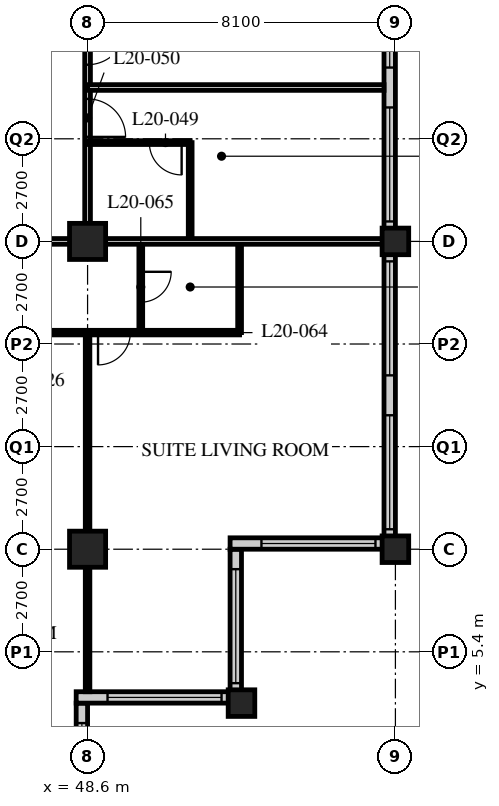
"""IFC4 building model, lengths in metres.
Left out: names, types, materials, properties, quantities, classifications, styles, units other than length and angle.
Written with IfcOpenShell. Run it as: python <this file> out.ifc"""

import sys

from ifc_helpers import new_model, si_unit, direction, frame, frame_2d, origin, origin_2d, place, context, subcontext, project, spatial, rectangle, hollow_rectangle, extrude, element, fill, save


model = new_model("IFC4")
c1 = context("Model", 3, precision=1e-05, world=origin(), true_north=direction((0.0, 1.0)))
c2 = subcontext(c1, "Body", "Model", "MODEL_VIEW")
j1 = project(units=[si_unit("LENGTHUNIT", "METRE"), si_unit("PLANEANGLEUNIT", "RADIAN")], contexts=[c1])
p1 = place(None, origin())
s1 = spatial("IfcSite", under=j1, at=p1, CompositionType="ELEMENT")
p2 = place(p1, origin())
s2 = spatial("IfcBuilding", under=s1, at=p2, CompositionType="ELEMENT")
p3 = place(p2, frame((0.0, 0.0, 80.6)))
s3 = spatial("IfcBuildingStorey", under=s2, at=p3, CompositionType="ELEMENT", Elevation=80.6)
for number, where, z_axis, x_axis in (
    (1, (48.6, 8.1, 0.0), (0.0, 0.0, 1.0), (1.0, 0.0, 0.0)),
    (2, (48.6, 16.2, 0.0), (0.0, 0.0, 1.0), (1.0, 0.0, 0.0)),
):
    element("IfcColumn", number, at=place(p3, frame(where, z_axis=z_axis, x_axis=x_axis)), inside=s3, PredefinedType="COLUMN", context=c2, shape_type="SweptSolid", body=[
        extrude(hollow_rectangle(XDim=0.95, YDim=0.95, WallThickness=0.095, at=origin_2d()), origin(), (0.0, 0.0, 1.0), 3.4),
    ])
p4 = place(p3, frame((52.65, 4.05, 0.0), z_axis=(0.0, 0.0, 1.0), x_axis=(1.0, 0.0, 0.0)))
e3 = element("IfcColumn", 3, at=p4, inside=s3, PredefinedType="COLUMN", context=c2, shape_type="SweptSolid", body=[
    extrude(hollow_rectangle(XDim=0.7, YDim=0.7, WallThickness=0.07, at=origin_2d()), origin(), (0.0, 0.0, 1.0), 3.4),
])
for number, where, z_axis, x_axis in (
    (4, (56.7, 8.1, 0.0), (0.0, 0.0, 1.0), (1.0, 0.0, 0.0)),
    (5, (56.7, 16.2, 0.0), (0.0, 0.0, 1.0), (1.0, 0.0, 0.0)),
):
    element("IfcColumn", number, at=place(p3, frame(where, z_axis=z_axis, x_axis=x_axis)), inside=s3, PredefinedType="COLUMN", context=c2, shape_type="SweptSolid", body=[
        extrude(hollow_rectangle(XDim=0.7, YDim=0.7, WallThickness=0.06, at=origin_2d()), origin(), (0.0, 0.0, 1.0), 3.4),
    ])
p5 = place(p3, frame((48.45, 0.3, 0.0), z_axis=(0.0, 0.0, 1.0), x_axis=(0.0, 1.0, 0.0)))
e6 = element("IfcWall", 6, at=p5, inside=s3, PredefinedType="SOLIDWALL", context=c2, shape_type="SweptSolid", body=[
    extrude(rectangle(XDim=3.75, YDim=0.3, at=frame_2d((1.875, 0.0))), origin(), (0.0, 0.0, 1.0), 3.19),
])
p6 = place(p5, frame((0.225, 0.0, 0.9)))
e7 = element("IfcOpeningElement", 7, at=p6, cuts=e6, PredefinedType="OPENING", context=c2, shape_type="SweptSolid", body=[
    extrude(rectangle(XDim=3.0, YDim=1.5, at=frame_2d((1.5, 0.75))), frame((0.0, 0.16, 0.0), z_axis=(0.0, -1.0, 0.0), x_axis=(1.0, 0.0, 0.0)), (0.0, 0.0, 1.0), 0.32),
])
p7 = place(p3, frame((48.3, 4.2, 0.0), z_axis=(0.0, 0.0, 1.0), x_axis=(1.0, 0.0, 0.0)))
e8 = element("IfcWall", 8, at=p7, inside=s3, PredefinedType="SOLIDWALL", context=c2, shape_type="SweptSolid", body=[
    extrude(rectangle(XDim=4.35, YDim=0.3, at=frame_2d((2.175, 0.0))), origin(), (0.0, 0.0, 1.0), 3.19),
])
p8 = place(p7, frame((0.825, 0.0, 0.9)))
e9 = element("IfcOpeningElement", 9, at=p8, cuts=e8, PredefinedType="OPENING", context=c2, shape_type="SweptSolid", body=[
    extrude(rectangle(XDim=3.0, YDim=1.5, at=frame_2d((1.5, 0.75))), frame((0.0, 0.16, 0.0), z_axis=(0.0, -1.0, 0.0), x_axis=(1.0, 0.0, 0.0)), (0.0, 0.0, 1.0), 0.32),
])
p9 = place(p3, frame((52.5, 4.35, 0.0), z_axis=(0.0, 0.0, 1.0), x_axis=(0.0, 1.0, 0.0)))
e10 = element("IfcWall", 10, at=p9, inside=s3, PredefinedType="SOLIDWALL", context=c2, shape_type="SweptSolid", body=[
    extrude(rectangle(XDim=3.75, YDim=0.3, at=frame_2d((1.875, 0.0))), origin(), (0.0, 0.0, 1.0), 3.19),
])
p10 = place(p9, frame((0.225, 0.0, 0.9)))
e11 = element("IfcOpeningElement", 11, at=p10, cuts=e10, PredefinedType="OPENING", context=c2, shape_type="SweptSolid", body=[
    extrude(rectangle(XDim=3.0, YDim=1.5, at=frame_2d((1.5, 0.75))), frame((0.0, 0.16, 0.0), z_axis=(0.0, -1.0, 0.0), x_axis=(1.0, 0.0, 0.0)), (0.0, 0.0, 1.0), 0.32),
])
p11 = place(p3, frame((52.35, 8.25, 0.0), z_axis=(0.0, 0.0, 1.0), x_axis=(1.0, 0.0, 0.0)))
e12 = element("IfcWall", 12, at=p11, inside=s3, PredefinedType="SOLIDWALL", context=c2, shape_type="SweptSolid", body=[
    extrude(rectangle(XDim=4.35, YDim=0.3, at=frame_2d((2.175, 0.0))), origin(), (0.0, 0.0, 1.0), 3.19),
])
p12 = place(p11, frame((0.825, 0.0, 0.9)))
e13 = element("IfcOpeningElement", 13, at=p12, cuts=e12, PredefinedType="OPENING", context=c2, shape_type="SweptSolid", body=[
    extrude(rectangle(XDim=3.0, YDim=1.5, at=frame_2d((1.5, 0.75))), frame((0.0, 0.16, 0.0), z_axis=(0.0, -1.0, 0.0), x_axis=(1.0, 0.0, 0.0)), (0.0, 0.0, 1.0), 0.32),
])
p13 = place(p3, frame((56.55, 8.4, 0.0), z_axis=(0.0, 0.0, 1.0), x_axis=(0.0, 1.0, 0.0)))
e14 = element("IfcWall", 14, at=p13, inside=s3, PredefinedType="SOLIDWALL", context=c2, shape_type="SweptSolid", body=[
    extrude(rectangle(XDim=32.1, YDim=0.3, at=frame_2d((16.05, 0.0))), origin(), (0.0, 0.0, 1.0), 3.19),
])
p14 = place(p13, frame((0.225, 0.0, 0.9)))
e15 = element("IfcOpeningElement", 15, at=p14, cuts=e14, PredefinedType="OPENING", context=c2, shape_type="SweptSolid", body=[
    extrude(rectangle(XDim=3.0, YDim=1.5, at=frame_2d((1.5, 0.75))), frame((0.0, 0.16, 0.0), z_axis=(0.0, -1.0, 0.0), x_axis=(1.0, 0.0, 0.0)), (0.0, 0.0, 1.0), 0.32),
])
p15 = place(p13, frame((4.275, 0.0, 0.9)))
e16 = element("IfcOpeningElement", 16, at=p15, cuts=e14, PredefinedType="OPENING", context=c2, shape_type="SweptSolid", body=[
    extrude(rectangle(XDim=3.0, YDim=1.5, at=frame_2d((1.5, 0.75))), frame((0.0, 0.16, 0.0), z_axis=(0.0, -1.0, 0.0), x_axis=(1.0, 0.0, 0.0)), (0.0, 0.0, 1.0), 0.32),
])
p16 = place(p13, frame((8.325, 0.0, 0.9)))
e17 = element("IfcOpeningElement", 17, at=p16, cuts=e14, PredefinedType="OPENING", context=c2, shape_type="SweptSolid", body=[
    extrude(rectangle(XDim=3.0, YDim=1.5, at=frame_2d((1.5, 0.75))), frame((0.0, 0.16, 0.0), z_axis=(0.0, -1.0, 0.0), x_axis=(1.0, 0.0, 0.0)), (0.0, 0.0, 1.0), 0.32),
])
p17 = place(p13, frame((12.375, 0.0, 0.9)))
e18 = element("IfcOpeningElement", 18, at=p17, cuts=e14, PredefinedType="OPENING", context=c2, shape_type="SweptSolid", body=[
    extrude(rectangle(XDim=3.0, YDim=1.5, at=frame_2d((1.5, 0.75))), frame((0.0, 0.16, 0.0), z_axis=(0.0, -1.0, 0.0), x_axis=(1.0, 0.0, 0.0)), (0.0, 0.0, 1.0), 0.32),
])
p18 = place(p13, frame((16.425, 0.0, 0.9)))
e19 = element("IfcOpeningElement", 19, at=p18, cuts=e14, PredefinedType="OPENING", context=c2, shape_type="SweptSolid", body=[
    extrude(rectangle(XDim=3.0, YDim=1.5, at=frame_2d((1.5, 0.75))), frame((0.0, 0.16, 0.0), z_axis=(0.0, -1.0, 0.0), x_axis=(1.0, 0.0, 0.0)), (0.0, 0.0, 1.0), 0.32),
])
p19 = place(p13, frame((20.475, 0.0, 0.9)))
e20 = element("IfcOpeningElement", 20, at=p19, cuts=e14, PredefinedType="OPENING", context=c2, shape_type="SweptSolid", body=[
    extrude(rectangle(XDim=3.0, YDim=1.5, at=frame_2d((1.5, 0.75))), frame((0.0, 0.16, 0.0), z_axis=(0.0, -1.0, 0.0), x_axis=(1.0, 0.0, 0.0)), (0.0, 0.0, 1.0), 0.32),
])
p20 = place(p13, frame((24.525, 0.0, 0.9)))
e21 = element("IfcOpeningElement", 21, at=p20, cuts=e14, PredefinedType="OPENING", context=c2, shape_type="SweptSolid", body=[
    extrude(rectangle(XDim=3.0, YDim=1.5, at=frame_2d((1.5, 0.75))), frame((0.0, 0.16, 0.0), z_axis=(0.0, -1.0, 0.0), x_axis=(1.0, 0.0, 0.0)), (0.0, 0.0, 1.0), 0.32),
])
p21 = place(p13, frame((28.575, 0.0, 0.9)))
e22 = element("IfcOpeningElement", 22, at=p21, cuts=e14, PredefinedType="OPENING", context=c2, shape_type="SweptSolid", body=[
    extrude(rectangle(XDim=3.0, YDim=1.5, at=frame_2d((1.5, 0.75))), frame((0.0, 0.16, 0.0), z_axis=(0.0, -1.0, 0.0), x_axis=(1.0, 0.0, 0.0)), (0.0, 0.0, 1.0), 0.32),
])
p22 = place(p3, frame((12.15, 16.2, 0.0), z_axis=(0.0, 0.0, 1.0), x_axis=(1.0, 0.0, 0.0)))
e23 = element("IfcWall", 23, at=p22, inside=s3, PredefinedType="PARTITIONING", context=c2, shape_type="SweptSolid", body=[
    extrude(rectangle(XDim=36.45, YDim=0.15, at=frame_2d((18.225, 0.0))), origin(), (0.0, 0.0, 1.0), 2.428),
])
p23 = place(p22, frame((6.5, 0.0, 0.0)))
e24 = element("IfcOpeningElement", 24, at=p23, cuts=e23, PredefinedType="OPENING", context=c2, shape_type="SweptSolid", body=[
    extrude(rectangle(XDim=1.0, YDim=2.1, at=frame_2d((0.5, 1.05))), frame((0.0, 0.085, 0.0), z_axis=(0.0, -1.0, 0.0), x_axis=(1.0, 0.0, 0.0)), (0.0, 0.0, 1.0), 0.17),
])
p24 = place(p22, frame((8.4, 0.0, 0.0)))
e25 = element("IfcOpeningElement", 25, at=p24, cuts=e23, PredefinedType="OPENING", context=c2, shape_type="SweptSolid", body=[
    extrude(rectangle(XDim=1.0, YDim=2.1, at=frame_2d((0.5, 1.05))), frame((0.0, 0.085, 0.0), z_axis=(0.0, -1.0, 0.0), x_axis=(1.0, 0.0, 0.0)), (0.0, 0.0, 1.0), 0.17),
])
p25 = place(p22, frame((14.9, 0.0, 0.0)))
e26 = element("IfcOpeningElement", 26, at=p25, cuts=e23, PredefinedType="OPENING", context=c2, shape_type="SweptSolid", body=[
    extrude(rectangle(XDim=1.0, YDim=2.1, at=frame_2d((0.5, 1.05))), frame((0.0, 0.085, 0.0), z_axis=(0.0, -1.0, 0.0), x_axis=(1.0, 0.0, 0.0)), (0.0, 0.0, 1.0), 0.17),
])
p26 = place(p22, frame((16.5, 0.0, 0.0)))
e27 = element("IfcOpeningElement", 27, at=p26, cuts=e23, PredefinedType="OPENING", context=c2, shape_type="SweptSolid", body=[
    extrude(rectangle(XDim=1.0, YDim=2.1, at=frame_2d((0.5, 1.05))), frame((0.0, 0.085, 0.0), z_axis=(0.0, -1.0, 0.0), x_axis=(1.0, 0.0, 0.0)), (0.0, 0.0, 1.0), 0.17),
])
p27 = place(p22, frame((22.7, 0.0, 0.0)))
e28 = element("IfcOpeningElement", 28, at=p27, cuts=e23, PredefinedType="OPENING", context=c2, shape_type="SweptSolid", body=[
    extrude(rectangle(XDim=1.0, YDim=2.1, at=frame_2d((0.5, 1.05))), frame((0.0, 0.085, 0.0), z_axis=(0.0, -1.0, 0.0), x_axis=(1.0, 0.0, 0.0)), (0.0, 0.0, 1.0), 0.17),
])
p28 = place(p22, frame((24.9, 0.0, 0.0)))
e29 = element("IfcOpeningElement", 29, at=p28, cuts=e23, PredefinedType="OPENING", context=c2, shape_type="SweptSolid", body=[
    extrude(rectangle(XDim=1.0, YDim=2.1, at=frame_2d((0.5, 1.05))), frame((0.0, 0.085, 0.0), z_axis=(0.0, -1.0, 0.0), x_axis=(1.0, 0.0, 0.0)), (0.0, 0.0, 1.0), 0.17),
])
p29 = place(p22, frame((30.8, 0.0, 0.0)))
e30 = element("IfcOpeningElement", 30, at=p29, cuts=e23, PredefinedType="OPENING", context=c2, shape_type="SweptSolid", body=[
    extrude(rectangle(XDim=1.0, YDim=2.1, at=frame_2d((0.5, 1.05))), frame((0.0, 0.085, 0.0), z_axis=(0.0, -1.0, 0.0), x_axis=(1.0, 0.0, 0.0)), (0.0, 0.0, 1.0), 0.17),
])
p30 = place(p22, frame((1.525, 0.0, 0.0)))
e31 = element("IfcOpeningElement", 31, at=p30, cuts=e23, PredefinedType="OPENING", context=c2, shape_type="SweptSolid", body=[
    extrude(rectangle(XDim=1.0, YDim=2.1, at=frame_2d((0.5, 1.05))), frame((0.0, 0.085, 0.0), z_axis=(0.0, -1.0, 0.0), x_axis=(1.0, 0.0, 0.0)), (0.0, 0.0, 1.0), 0.17),
])
p31 = place(p22, frame((33.925, 0.0, 0.0)))
e32 = element("IfcOpeningElement", 32, at=p31, cuts=e23, PredefinedType="OPENING", context=c2, shape_type="SweptSolid", body=[
    extrude(rectangle(XDim=1.0, YDim=2.1, at=frame_2d((0.5, 1.05))), frame((0.0, 0.085, 0.0), z_axis=(0.0, -1.0, 0.0), x_axis=(1.0, 0.0, 0.0)), (0.0, 0.0, 1.0), 0.17),
])
p32 = place(p3, frame((48.6, 16.2, 0.0), z_axis=(0.0, 0.0, 1.0), x_axis=(0.0, 1.0, 0.0)))
e33 = element("IfcWall", 33, at=p32, inside=s3, PredefinedType="PARTITIONING", context=c2, shape_type="SweptSolid", body=[
    extrude(rectangle(XDim=26.1, YDim=0.15, at=frame_2d((13.05, 0.0))), origin(), (0.0, 0.0, 1.0), 2.428),
])
p33 = place(p32, frame((2.75, 0.0, 0.0)))
e34 = element("IfcOpeningElement", 34, at=p33, cuts=e33, PredefinedType="OPENING", context=c2, shape_type="SweptSolid", body=[
    extrude(rectangle(XDim=1.0, YDim=2.1, at=frame_2d((0.5, 1.05))), frame((0.0, 0.085, 0.0), z_axis=(0.0, -1.0, 0.0), x_axis=(1.0, 0.0, 0.0)), (0.0, 0.0, 1.0), 0.17),
])
p34 = place(p32, frame((4.65, 0.0, 0.0)))
e35 = element("IfcOpeningElement", 35, at=p34, cuts=e33, PredefinedType="OPENING", context=c2, shape_type="SweptSolid", body=[
    extrude(rectangle(XDim=1.0, YDim=2.1, at=frame_2d((0.5, 1.05))), frame((0.0, 0.085, 0.0), z_axis=(0.0, -1.0, 0.0), x_axis=(1.0, 0.0, 0.0)), (0.0, 0.0, 1.0), 0.17),
])
p35 = place(p32, frame((13.55, 0.0, 0.0)))
e36 = element("IfcOpeningElement", 36, at=p35, cuts=e33, PredefinedType="OPENING", context=c2, shape_type="SweptSolid", body=[
    extrude(rectangle(XDim=1.0, YDim=2.1, at=frame_2d((0.5, 1.05))), frame((0.0, 0.085, 0.0), z_axis=(0.0, -1.0, 0.0), x_axis=(1.0, 0.0, 0.0)), (0.0, 0.0, 1.0), 0.17),
])
p36 = place(p32, frame((21.65, 0.0, 0.0)))
e37 = element("IfcOpeningElement", 37, at=p36, cuts=e33, PredefinedType="OPENING", context=c2, shape_type="SweptSolid", body=[
    extrude(rectangle(XDim=1.0, YDim=2.1, at=frame_2d((0.5, 1.05))), frame((0.0, 0.085, 0.0), z_axis=(0.0, -1.0, 0.0), x_axis=(1.0, 0.0, 0.0)), (0.0, 0.0, 1.0), 0.17),
])
p37 = place(p3, frame((51.3, 16.2, 0.0), z_axis=(0.0, 0.0, 1.0), x_axis=(0.0, 1.0, 0.0)))
e38 = element("IfcWall", 38, at=p37, inside=s3, PredefinedType="PARTITIONING", context=c2, shape_type="SweptSolid", body=[
    extrude(rectangle(XDim=2.6, YDim=0.1, at=frame_2d((1.3, 0.0))), origin(), (0.0, 0.0, 1.0), 3.19),
])
p38 = place(p3, frame((48.6, 18.8, 0.0), z_axis=(0.0, 0.0, 1.0), x_axis=(1.0, 0.0, 0.0)))
e39 = element("IfcWall", 39, at=p38, inside=s3, PredefinedType="PARTITIONING", context=c2, shape_type="SweptSolid", body=[
    extrude(rectangle(XDim=2.7, YDim=0.1, at=frame_2d((1.35, 0.0))), origin(), (0.0, 0.0, 1.0), 3.19),
])
p39 = place(p38, frame((1.625, 0.0, 0.0)))
e40 = element("IfcOpeningElement", 40, at=p39, cuts=e39, PredefinedType="OPENING", context=c2, shape_type="SweptSolid", body=[
    extrude(rectangle(XDim=0.85, YDim=2.1, at=frame_2d((0.425, 1.05))), frame((0.0, 0.06, 0.0), z_axis=(0.0, -1.0, 0.0), x_axis=(1.0, 0.0, 0.0)), (0.0, 0.0, 1.0), 0.12),
])
p40 = place(p3, frame((48.6, 20.25, 0.0), z_axis=(0.0, 0.0, 1.0), x_axis=(1.0, 0.0, 0.0)))
e41 = element("IfcWall", 41, at=p40, inside=s3, PredefinedType="PARTITIONING", context=c2, shape_type="SweptSolid", body=[
    extrude(rectangle(XDim=7.8, YDim=0.15, at=frame_2d((3.9, 0.0))), origin(), (0.0, 0.0, 1.0), 3.19),
])
p41 = place(p3, frame((44.55, 13.8, 0.0), z_axis=(0.0, 0.0, 1.0), x_axis=(1.0, 0.0, 0.0)))
e42 = element("IfcWall", 42, at=p41, inside=s3, PredefinedType="PARTITIONING", context=c2, shape_type="SweptSolid", body=[
    extrude(rectangle(XDim=8.05, YDim=0.12, at=frame_2d((4.025, 0.0))), origin(), (0.0, 0.0, 1.0), 3.19),
])
p42 = place(p41, frame((0.475, 0.0, 0.0)))
e43 = element("IfcOpeningElement", 43, at=p42, cuts=e42, PredefinedType="OPENING", context=c2, shape_type="SweptSolid", body=[
    extrude(rectangle(XDim=0.85, YDim=2.1, at=frame_2d((0.425, 1.05))), frame((0.0, 0.07, 0.0), z_axis=(0.0, -1.0, 0.0), x_axis=(1.0, 0.0, 0.0)), (0.0, 0.0, 1.0), 0.14),
])
p43 = place(p41, frame((4.325, 0.0, 0.0)))
e44 = element("IfcOpeningElement", 44, at=p43, cuts=e42, PredefinedType="OPENING", context=c2, shape_type="SweptSolid", body=[
    extrude(rectangle(XDim=0.85, YDim=2.1, at=frame_2d((0.425, 1.05))), frame((0.0, 0.07, 0.0), z_axis=(0.0, -1.0, 0.0), x_axis=(1.0, 0.0, 0.0)), (0.0, 0.0, 1.0), 0.14),
])
p44 = place(p3, frame((50.0, 16.2, 0.0), z_axis=(0.0, 0.0, 1.0), x_axis=(0.0, -1.0, 0.0)))
e45 = element("IfcWall", 45, at=p44, inside=s3, PredefinedType="PARTITIONING", context=c2, shape_type="SweptSolid", body=[
    extrude(rectangle(XDim=2.4, YDim=0.1, at=frame_2d((1.2, 0.0))), origin(), (0.0, 0.0, 1.0), 3.19),
])
p45 = place(p44, frame((0.8, 0.0, 0.0)))
e46 = element("IfcOpeningElement", 46, at=p45, cuts=e45, PredefinedType="OPENING", context=c2, shape_type="SweptSolid", body=[
    extrude(rectangle(XDim=0.8, YDim=2.1, at=frame_2d((0.4, 1.05))), frame((0.0, 0.06, 0.0), z_axis=(0.0, -1.0, 0.0), x_axis=(1.0, 0.0, 0.0)), (0.0, 0.0, 1.0), 0.12),
])
p46 = place(p3, frame((52.6, 16.2, 0.0), z_axis=(0.0, 0.0, 1.0), x_axis=(0.0, -1.0, 0.0)))
e47 = element("IfcWall", 47, at=p46, inside=s3, PredefinedType="PARTITIONING", context=c2, shape_type="SweptSolid", body=[
    extrude(rectangle(XDim=2.4, YDim=0.1, at=frame_2d((1.2, 0.0))), origin(), (0.0, 0.0, 1.0), 3.19),
])
p47 = place(p3, frame((48.6, 13.8, 0.0), z_axis=(0.0, 0.0, 1.0), x_axis=(0.0, -1.0, 0.0)))
e48 = element("IfcWall", 48, at=p47, inside=s3, PredefinedType="PARTITIONING", context=c2, shape_type="SweptSolid", body=[
    extrude(rectangle(XDim=9.45, YDim=0.12, at=frame_2d((4.725, 0.0))), origin(), (0.0, 0.0, 1.0), 2.428),
])
p48 = place(p3, frame((48.6, 16.2, 0.0), z_axis=(0.0, 0.0, 1.0), x_axis=(1.0, 0.0, 0.0)))
e49 = element("IfcWall", 49, at=p48, inside=s3, PredefinedType="PARTITIONING", context=c2, shape_type="SweptSolid", body=[
    extrude(rectangle(XDim=7.8, YDim=0.15, at=frame_2d((3.9, 0.0))), origin(), (0.0, 0.0, 1.0), 2.428),
])
p49 = place(p6, origin())
e50 = element("IfcWindow", 50, at=p49, inside=s3, PartitioningType="SINGLE_PANEL", PredefinedType="WINDOW", context=c2, shape_type="SweptSolid", body=[
    extrude(rectangle(XDim=3.0, YDim=1.5, at=frame_2d((1.5, 0.75))), frame((0.0, 0.03, 0.0), z_axis=(0.0, -1.0, 0.0), x_axis=(1.0, 0.0, 0.0)), (0.0, 0.0, 1.0), 0.06),
])
fill(e7, e50)
p50 = place(p8, origin())
e51 = element("IfcWindow", 51, at=p50, inside=s3, PartitioningType="SINGLE_PANEL", PredefinedType="WINDOW", context=c2, shape_type="SweptSolid", body=[
    extrude(rectangle(XDim=3.0, YDim=1.5, at=frame_2d((1.5, 0.75))), frame((0.0, 0.03, 0.0), z_axis=(0.0, -1.0, 0.0), x_axis=(1.0, 0.0, 0.0)), (0.0, 0.0, 1.0), 0.06),
])
fill(e9, e51)
p51 = place(p10, origin())
e52 = element("IfcWindow", 52, at=p51, inside=s3, PartitioningType="SINGLE_PANEL", PredefinedType="WINDOW", context=c2, shape_type="SweptSolid", body=[
    extrude(rectangle(XDim=3.0, YDim=1.5, at=frame_2d((1.5, 0.75))), frame((0.0, 0.03, 0.0), z_axis=(0.0, -1.0, 0.0), x_axis=(1.0, 0.0, 0.0)), (0.0, 0.0, 1.0), 0.06),
])
fill(e11, e52)
p52 = place(p12, origin())
e53 = element("IfcWindow", 53, at=p52, inside=s3, PartitioningType="SINGLE_PANEL", PredefinedType="WINDOW", context=c2, shape_type="SweptSolid", body=[
    extrude(rectangle(XDim=3.0, YDim=1.5, at=frame_2d((1.5, 0.75))), frame((0.0, 0.03, 0.0), z_axis=(0.0, -1.0, 0.0), x_axis=(1.0, 0.0, 0.0)), (0.0, 0.0, 1.0), 0.06),
])
fill(e13, e53)
p53 = place(p14, origin())
e54 = element("IfcWindow", 54, at=p53, inside=s3, PartitioningType="SINGLE_PANEL", PredefinedType="WINDOW", context=c2, shape_type="SweptSolid", body=[
    extrude(rectangle(XDim=3.0, YDim=1.5, at=frame_2d((1.5, 0.75))), frame((0.0, 0.03, 0.0), z_axis=(0.0, -1.0, 0.0), x_axis=(1.0, 0.0, 0.0)), (0.0, 0.0, 1.0), 0.06),
])
fill(e15, e54)
p54 = place(p15, origin())
e55 = element("IfcWindow", 55, at=p54, inside=s3, PartitioningType="SINGLE_PANEL", PredefinedType="WINDOW", context=c2, shape_type="SweptSolid", body=[
    extrude(rectangle(XDim=3.0, YDim=1.5, at=frame_2d((1.5, 0.75))), frame((0.0, 0.03, 0.0), z_axis=(0.0, -1.0, 0.0), x_axis=(1.0, 0.0, 0.0)), (0.0, 0.0, 1.0), 0.06),
])
fill(e16, e55)
p55 = place(p16, origin())
e56 = element("IfcWindow", 56, at=p55, inside=s3, PartitioningType="SINGLE_PANEL", PredefinedType="WINDOW", context=c2, shape_type="SweptSolid", body=[
    extrude(rectangle(XDim=3.0, YDim=1.5, at=frame_2d((1.5, 0.75))), frame((0.0, 0.03, 0.0), z_axis=(0.0, -1.0, 0.0), x_axis=(1.0, 0.0, 0.0)), (0.0, 0.0, 1.0), 0.06),
])
fill(e17, e56)
p56 = place(p17, origin())
e57 = element("IfcWindow", 57, at=p56, inside=s3, PartitioningType="SINGLE_PANEL", PredefinedType="WINDOW", context=c2, shape_type="SweptSolid", body=[
    extrude(rectangle(XDim=3.0, YDim=1.5, at=frame_2d((1.5, 0.75))), frame((0.0, 0.03, 0.0), z_axis=(0.0, -1.0, 0.0), x_axis=(1.0, 0.0, 0.0)), (0.0, 0.0, 1.0), 0.06),
])
fill(e18, e57)
p57 = place(p39, origin())
e58 = element("IfcDoor", 58, at=p57, inside=s3, OperationType="SINGLE_SWING_LEFT", PredefinedType="DOOR", context=c2, shape_type="SweptSolid", body=[
    extrude(rectangle(XDim=0.85, YDim=2.1, at=frame_2d((0.425, 1.05))), frame((0.0, 0.025, 0.0), z_axis=(0.0, -1.0, 0.0), x_axis=(1.0, 0.0, 0.0)), (0.0, 0.0, 1.0), 0.05),
])
fill(e40, e58)
p58 = place(p33, origin())
e59 = element("IfcDoor", 59, at=p58, inside=s3, OperationType="SINGLE_SWING_RIGHT", PredefinedType="DOOR", context=c2, shape_type="SweptSolid", body=[
    extrude(rectangle(XDim=1.0, YDim=2.1, at=frame_2d((0.5, 1.05))), frame((0.0, 0.025, 0.0), z_axis=(0.0, -1.0, 0.0), x_axis=(1.0, 0.0, 0.0)), (0.0, 0.0, 1.0), 0.05),
])
fill(e34, e59)
p59 = place(p34, origin())
e60 = element("IfcDoor", 60, at=p59, inside=s3, OperationType="SINGLE_SWING_LEFT", PredefinedType="DOOR", context=c2, shape_type="SweptSolid", body=[
    extrude(rectangle(XDim=1.0, YDim=2.1, at=frame_2d((0.5, 1.05))), frame((0.0, 0.025, 0.0), z_axis=(0.0, -1.0, 0.0), x_axis=(1.0, 0.0, 0.0)), (0.0, 0.0, 1.0), 0.05),
])
fill(e35, e60)
p60 = place(p45, origin())
e61 = element("IfcDoor", 61, at=p60, inside=s3, OperationType="SINGLE_SWING_LEFT", PredefinedType="DOOR", context=c2, shape_type="SweptSolid", body=[
    extrude(rectangle(XDim=0.8, YDim=2.1, at=frame_2d((0.4, 1.05))), frame((0.0, 0.025, 0.0), z_axis=(0.0, -1.0, 0.0), x_axis=(1.0, 0.0, 0.0)), (0.0, 0.0, 1.0), 0.05),
])
fill(e46, e61)
p61 = place(p43, origin())
e62 = element("IfcDoor", 62, at=p61, inside=s3, OperationType="SINGLE_SWING_RIGHT", PredefinedType="DOOR", context=c2, shape_type="SweptSolid", body=[
    extrude(rectangle(XDim=0.85, YDim=2.1, at=frame_2d((0.425, 1.05))), frame((0.0, 0.025, 0.0), z_axis=(0.0, -1.0, 0.0), x_axis=(1.0, 0.0, 0.0)), (0.0, 0.0, 1.0), 0.05),
])
fill(e44, e62)
save(model, sys.argv[1])
